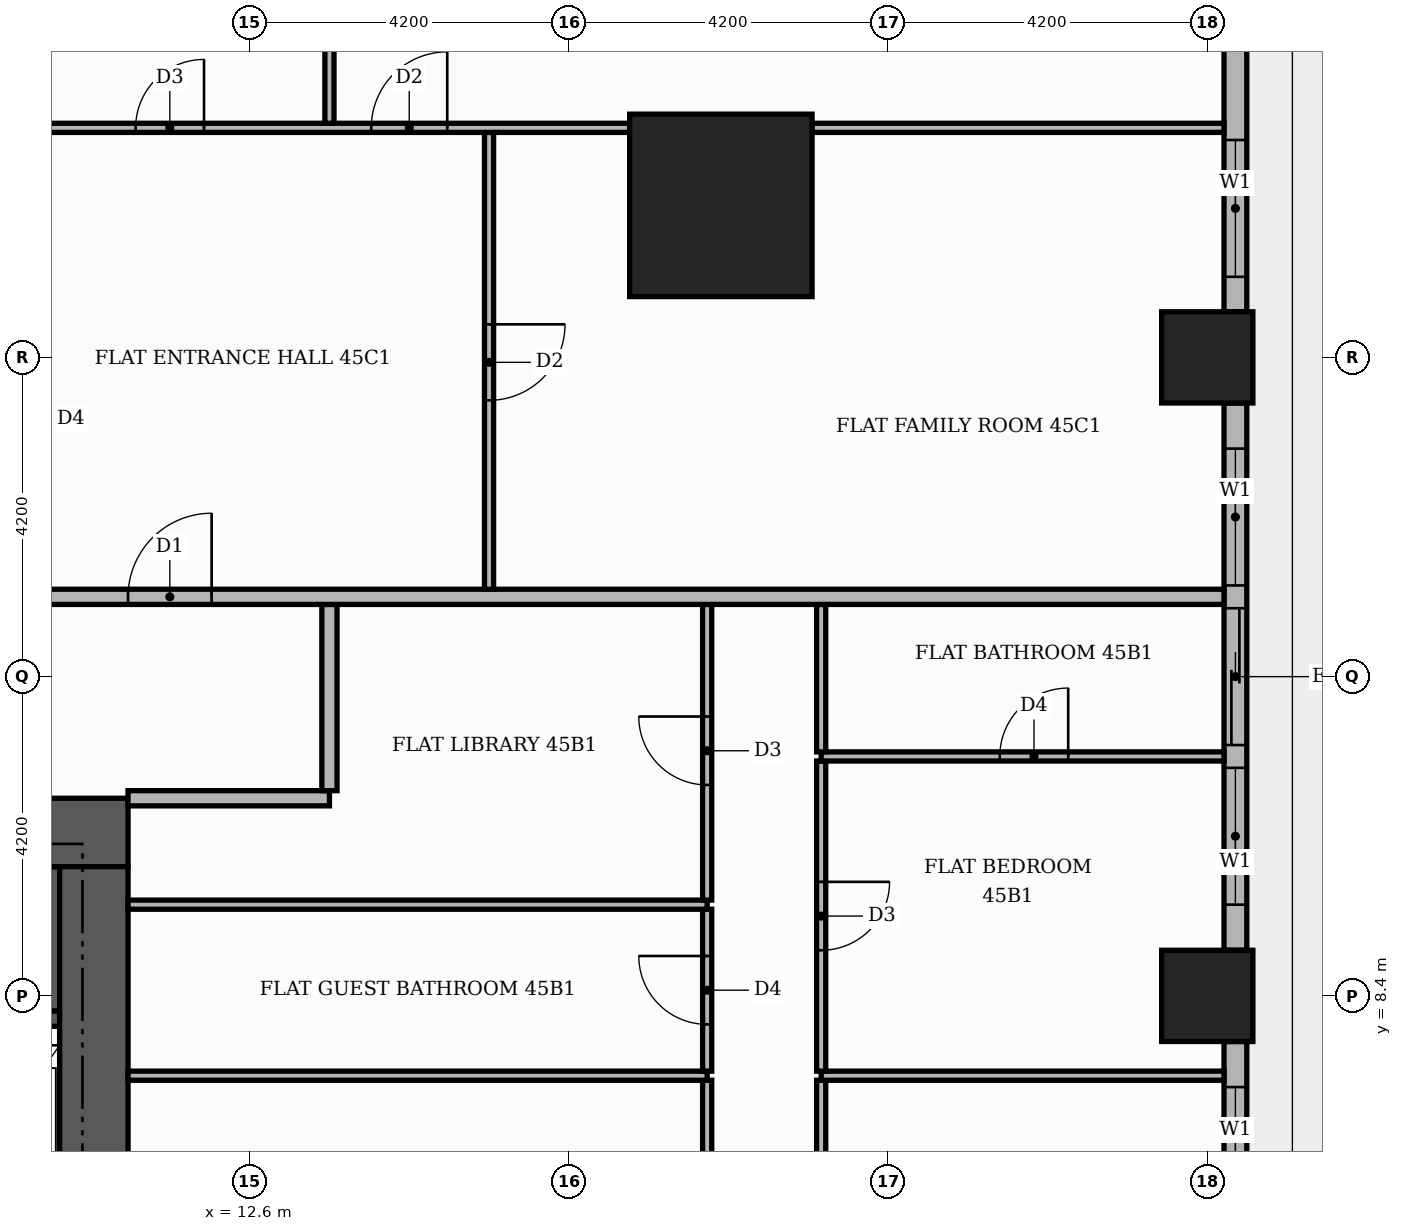
"""IFC4 building model, lengths in metres.
Left out: names, types, materials, properties, quantities, classifications, styles, units other than length and angle.
Written with IfcOpenShell. Run it as: python <this file> out.ifc"""

import sys

from ifc_helpers import new_model, si_unit, direction, frame, frame_2d, origin, origin_2d, place, context, subcontext, project, spatial, rectangle, extrude, element, fill, save


model = new_model("IFC4")
c1 = context("Model", 3, precision=1e-05, world=origin(), true_north=direction((0.0, 1.0)))
c2 = subcontext(c1, "Body", "Model", "MODEL_VIEW")
j1 = project(units=[si_unit("LENGTHUNIT", "METRE"), si_unit("PLANEANGLEUNIT", "RADIAN")], contexts=[c1])
p1 = place(None, origin())
s1 = spatial("IfcSite", under=j1, at=p1, CompositionType="ELEMENT")
p2 = place(p1, origin())
s2 = spatial("IfcBuilding", under=s1, at=p2, CompositionType="ELEMENT")
p3 = place(p2, frame((0.0, 0.0, 192.3)))
s3 = spatial("IfcBuildingStorey", under=s2, at=p3, CompositionType="ELEMENT", Elevation=192.3)
p4 = place(p3, frame((5.5, 9.15, 0.0), z_axis=(0.0, 0.0, 1.0), x_axis=(1.0, 0.0, 0.0)))
e1 = element("IfcWall", 1, at=p4, inside=s3, PredefinedType="SHEAR", context=c2, shape_type="SweptSolid", body=[
    extrude(rectangle(XDim=4.6, YDim=1.9, at=frame_2d((2.3, 0.0))), origin(), (0.0, 0.0, 1.0), 3.48),
])
p5 = place(p3, frame((8.1, 8.1, 0.0), z_axis=(0.0, 0.0, 1.0), x_axis=(1.0, 0.0, 0.0)))
e2 = element("IfcWall", 2, at=p5, inside=s3, PredefinedType="SHEAR", context=c2, shape_type="SweptSolid", body=[
    extrude(rectangle(XDim=2.0, YDim=0.2, at=frame_2d((1.0, 0.0))), origin(), (0.0, 0.0, 1.0), 3.48),
])
p6 = place(p3, frame((-11.0, 10.55, 0.0), z_axis=(0.0, 0.0, 1.0), x_axis=(1.0, 0.0, 0.0)))
e3 = element("IfcWall", 3, at=p6, inside=s3, PredefinedType="SHEAR", context=c2, shape_type="SweptSolid", body=[
    extrude(rectangle(XDim=22.0, YDim=0.9, at=frame_2d((11.0, 0.0))), origin(), (0.0, 0.0, 1.0), 3.48),
])
p7 = place(p6, frame((13.3, 0.0, 0.0)))
e4 = element("IfcOpeningElement", 4, at=p7, cuts=e3, PredefinedType="OPENING", context=c2, shape_type="SweptSolid", body=[
    extrude(rectangle(XDim=1.8, YDim=2.2, at=frame_2d((0.9, 1.1))), frame((0.0, 0.46, 0.0), z_axis=(0.0, -1.0, 0.0), x_axis=(1.0, 0.0, 0.0)), (0.0, 0.0, 1.0), 0.92),
])
p8 = place(p3, frame((10.55, -10.1, 0.0), z_axis=(0.0, 0.0, 1.0), x_axis=(0.0, 1.0, 0.0)))
e5 = element("IfcWall", 5, at=p8, inside=s3, PredefinedType="SHEAR", context=c2, shape_type="SweptSolid", body=[
    extrude(rectangle(XDim=20.2, YDim=0.9, at=frame_2d((10.1, 0.0))), origin(), (0.0, 0.0, 1.0), 3.48),
])
p9 = place(p3, frame((18.8, 18.8, 0.0), z_axis=(0.0, 0.0, 1.0), x_axis=(1.0, 0.0, 0.0)))
e6 = element("IfcColumn", 6, at=p9, inside=s3, PredefinedType="COLUMN", context=c2, shape_type="SweptSolid", body=[
    extrude(rectangle(XDim=2.4, YDim=2.4, at=origin_2d()), origin(), (0.0, 0.0, 1.0), 3.9),
])
for number, where, z_axis, x_axis in (
    (7, (25.2, 8.4, 0.0), (0.0, 0.0, 1.0), (1.0, 0.0, 0.0)),
    (8, (25.2, 16.8, 0.0), (0.0, 0.0, 1.0), (1.0, 0.0, 0.0)),
):
    element("IfcColumn", number, at=place(p3, frame(where, z_axis=z_axis, x_axis=x_axis)), inside=s3, PredefinedType="COLUMN", context=c2, shape_type="SweptSolid", body=[
        extrude(rectangle(XDim=1.2, YDim=1.2, at=origin_2d()), origin(), (0.0, 0.0, 1.0), 3.9),
    ])
p10 = place(p3, frame((25.57, 3.45, 0.0), z_axis=(0.0, 0.0, 1.0), x_axis=(0.0, 1.0, 0.0)))
e9 = element("IfcWall", 9, at=p10, inside=s3, PredefinedType="STANDARD", context=c2, shape_type="SweptSolid", body=[
    extrude(rectangle(XDim=4.35, YDim=0.3, at=frame_2d((2.175, 0.0))), origin(), (0.0, 0.0, 1.0), 3.48),
])
p11 = place(p10, frame((1.95, 0.0, 0.9)))
e10 = element("IfcOpeningElement", 10, at=p11, cuts=e9, PredefinedType="OPENING", context=c2, shape_type="SweptSolid", body=[
    extrude(rectangle(XDim=1.8, YDim=2.1, at=frame_2d((0.9, 1.05))), frame((0.0, 0.16, 0.0), z_axis=(0.0, -1.0, 0.0), x_axis=(1.0, 0.0, 0.0)), (0.0, 0.0, 1.0), 0.32),
])
p12 = place(p3, frame((25.57, 9.0, 0.0), z_axis=(0.0, 0.0, 1.0), x_axis=(0.0, 1.0, 0.0)))
e11 = element("IfcWall", 11, at=p12, inside=s3, PredefinedType="STANDARD", context=c2, shape_type="SweptSolid", body=[
    extrude(rectangle(XDim=7.2, YDim=0.3, at=frame_2d((3.6, 0.0))), origin(), (0.0, 0.0, 1.0), 3.48),
])
p13 = place(p12, frame((0.6, 0.0, 0.9)))
e12 = element("IfcOpeningElement", 12, at=p13, cuts=e11, PredefinedType="OPENING", context=c2, shape_type="SweptSolid", body=[
    extrude(rectangle(XDim=1.8, YDim=2.1, at=frame_2d((0.9, 1.05))), frame((0.0, 0.16, 0.0), z_axis=(0.0, -1.0, 0.0), x_axis=(1.0, 0.0, 0.0)), (0.0, 0.0, 1.0), 0.32),
])
p14 = place(p12, frame((2.7, 0.0, 0.0)))
e13 = element("IfcOpeningElement", 13, at=p14, cuts=e11, PredefinedType="OPENING", context=c2, shape_type="SweptSolid", body=[
    extrude(rectangle(XDim=1.8, YDim=2.4, at=frame_2d((0.9, 1.2))), frame((0.0, 0.16, 0.0), z_axis=(0.0, -1.0, 0.0), x_axis=(1.0, 0.0, 0.0)), (0.0, 0.0, 1.0), 0.32),
])
p15 = place(p12, frame((4.8, 0.0, 0.9)))
e14 = element("IfcOpeningElement", 14, at=p15, cuts=e11, PredefinedType="OPENING", context=c2, shape_type="SweptSolid", body=[
    extrude(rectangle(XDim=1.8, YDim=2.1, at=frame_2d((0.9, 1.05))), frame((0.0, 0.16, 0.0), z_axis=(0.0, -1.0, 0.0), x_axis=(1.0, 0.0, 0.0)), (0.0, 0.0, 1.0), 0.32),
])
p16 = place(p3, frame((25.57, 17.4, 0.0), z_axis=(0.0, 0.0, 1.0), x_axis=(0.0, 1.0, 0.0)))
e15 = element("IfcWall", 15, at=p16, inside=s3, PredefinedType="STANDARD", context=c2, shape_type="SweptSolid", body=[
    extrude(rectangle(XDim=3.82, YDim=0.3, at=frame_2d((1.91, 0.0))), origin(), (0.0, 0.0, 1.0), 3.48),
])
p17 = place(p16, frame((0.46, 0.0, 0.9)))
e16 = element("IfcOpeningElement", 16, at=p17, cuts=e15, PredefinedType="OPENING", context=c2, shape_type="SweptSolid", body=[
    extrude(rectangle(XDim=1.8, YDim=2.1, at=frame_2d((0.9, 1.05))), frame((0.0, 0.16, 0.0), z_axis=(0.0, -1.0, 0.0), x_axis=(1.0, 0.0, 0.0)), (0.0, 0.0, 1.0), 0.32),
])
p18 = place(p3, frame((18.62, 3.21, 0.0), z_axis=(0.0, 0.0, 1.0), x_axis=(0.0, 1.0, 0.0)))
e17 = element("IfcWall", 17, at=p18, inside=s3, PredefinedType="PARTITIONING", context=c2, shape_type="SweptSolid", body=[
    extrude(rectangle(XDim=4.08, YDim=0.12, at=frame_2d((2.04, 0.0))), origin(), (0.0, 0.0, 1.0), 3.48),
])
p19 = place(p18, frame((1.59, 0.0, 0.0)))
e18 = element("IfcOpeningElement", 18, at=p19, cuts=e17, PredefinedType="OPENING", context=c2, shape_type="SweptSolid", body=[
    extrude(rectangle(XDim=0.9, YDim=2.1, at=frame_2d((0.45, 1.05))), frame((0.0, 0.07, 0.0), z_axis=(0.0, -1.0, 0.0), x_axis=(1.0, 0.0, 0.0)), (0.0, 0.0, 1.0), 0.14),
])
p20 = place(p3, frame((20.12, 3.21, 0.0), z_axis=(0.0, 0.0, 1.0), x_axis=(0.0, 1.0, 0.0)))
e19 = element("IfcWall", 19, at=p20, inside=s3, PredefinedType="PARTITIONING", context=c2, shape_type="SweptSolid", body=[
    extrude(rectangle(XDim=4.08, YDim=0.12, at=frame_2d((2.04, 0.0))), origin(), (0.0, 0.0, 1.0), 3.48),
])
p21 = place(p20, frame((1.59, 0.0, 0.0)))
e20 = element("IfcOpeningElement", 20, at=p21, cuts=e19, PredefinedType="OPENING", context=c2, shape_type="SweptSolid", body=[
    extrude(rectangle(XDim=0.9, YDim=2.1, at=frame_2d((0.45, 1.05))), frame((0.0, 0.07, 0.0), z_axis=(0.0, -1.0, 0.0), x_axis=(1.0, 0.0, 0.0)), (0.0, 0.0, 1.0), 0.14),
])
p22 = place(p3, frame((11.0, 7.35, 0.0), z_axis=(0.0, 0.0, 1.0), x_axis=(1.0, 0.0, 0.0)))
e21 = element("IfcWall", 21, at=p22, inside=s3, PredefinedType="PARTITIONING", context=c2, shape_type="SweptSolid", body=[
    extrude(rectangle(XDim=7.62, YDim=0.12, at=frame_2d((3.81, 0.0))), origin(), (0.0, 0.0, 1.0), 3.48),
])
p23 = place(p3, frame((20.12, 7.35, 0.0), z_axis=(0.0, 0.0, 1.0), x_axis=(1.0, 0.0, 0.0)))
e22 = element("IfcWall", 22, at=p23, inside=s3, PredefinedType="PARTITIONING", context=c2, shape_type="SweptSolid", body=[
    extrude(rectangle(XDim=5.3, YDim=0.12, at=frame_2d((2.65, 0.0))), origin(), (0.0, 0.0, 1.0), 3.48),
])
p24 = place(p3, frame((18.62, 7.41, 0.0), z_axis=(0.0, 0.0, 1.0), x_axis=(0.0, 1.0, 0.0)))
e23 = element("IfcWall", 23, at=p24, inside=s3, PredefinedType="PARTITIONING", context=c2, shape_type="SweptSolid", body=[
    extrude(rectangle(XDim=2.13, YDim=0.12, at=frame_2d((1.065, 0.0))), origin(), (0.0, 0.0, 1.0), 3.48),
])
p25 = place(p24, frame((0.615, 0.0, 0.0)))
e24 = element("IfcOpeningElement", 24, at=p25, cuts=e23, PredefinedType="OPENING", context=c2, shape_type="SweptSolid", body=[
    extrude(rectangle(XDim=0.9, YDim=2.1, at=frame_2d((0.45, 1.05))), frame((0.0, 0.07, 0.0), z_axis=(0.0, -1.0, 0.0), x_axis=(1.0, 0.0, 0.0)), (0.0, 0.0, 1.0), 0.14),
])
p26 = place(p3, frame((20.12, 7.41, 0.0), z_axis=(0.0, 0.0, 1.0), x_axis=(0.0, 1.0, 0.0)))
e25 = element("IfcWall", 25, at=p26, inside=s3, PredefinedType="PARTITIONING", context=c2, shape_type="SweptSolid", body=[
    extrude(rectangle(XDim=4.08, YDim=0.12, at=frame_2d((2.04, 0.0))), origin(), (0.0, 0.0, 1.0), 3.48),
])
p27 = place(p26, frame((1.59, 0.0, 0.0)))
e26 = element("IfcOpeningElement", 26, at=p27, cuts=e25, PredefinedType="OPENING", context=c2, shape_type="SweptSolid", body=[
    extrude(rectangle(XDim=0.9, YDim=2.1, at=frame_2d((0.45, 1.05))), frame((0.0, 0.07, 0.0), z_axis=(0.0, -1.0, 0.0), x_axis=(1.0, 0.0, 0.0)), (0.0, 0.0, 1.0), 0.14),
])
p28 = place(p3, frame((11.0, 9.6, 0.0), z_axis=(0.0, 0.0, 1.0), x_axis=(1.0, 0.0, 0.0)))
e27 = element("IfcWall", 27, at=p28, inside=s3, PredefinedType="PARTITIONING", context=c2, shape_type="SweptSolid", body=[
    extrude(rectangle(XDim=7.62, YDim=0.12, at=frame_2d((3.81, 0.0))), origin(), (0.0, 0.0, 1.0), 3.48),
])
p29 = place(p3, frame((18.62, 9.66, 0.0), z_axis=(0.0, 0.0, 1.0), x_axis=(0.0, 1.0, 0.0)))
e28 = element("IfcWall", 28, at=p29, inside=s3, PredefinedType="PARTITIONING", context=c2, shape_type="SweptSolid", body=[
    extrude(rectangle(XDim=3.89, YDim=0.12, at=frame_2d((1.945, 0.0))), origin(), (0.0, 0.0, 1.0), 3.48),
])
p30 = place(p29, frame((1.515, 0.0, 0.0)))
e29 = element("IfcOpeningElement", 29, at=p30, cuts=e28, PredefinedType="OPENING", context=c2, shape_type="SweptSolid", body=[
    extrude(rectangle(XDim=0.9, YDim=2.1, at=frame_2d((0.45, 1.05))), frame((0.0, 0.07, 0.0), z_axis=(0.0, -1.0, 0.0), x_axis=(1.0, 0.0, 0.0)), (0.0, 0.0, 1.0), 0.14),
])
p31 = place(p3, frame((11.0, 11.0, 0.0), z_axis=(0.0, 0.0, 1.0), x_axis=(1.0, 0.0, 0.0)))
e30 = element("IfcWall", 30, at=p31, inside=s3, PredefinedType="PARTITIONING", context=c2, shape_type="SweptSolid", body=[
    extrude(rectangle(XDim=2.65, YDim=0.2, at=frame_2d((1.325, 0.0))), origin(), (0.0, 0.0, 1.0), 3.48),
])
p32 = place(p3, frame((13.65, 11.1, 0.0), z_axis=(0.0, 0.0, 1.0), x_axis=(0.0, 1.0, 0.0)))
e31 = element("IfcWall", 31, at=p32, inside=s3, PredefinedType="PARTITIONING", context=c2, shape_type="SweptSolid", body=[
    extrude(rectangle(XDim=2.45, YDim=0.2, at=frame_2d((1.225, 0.0))), origin(), (0.0, 0.0, 1.0), 3.48),
])
p33 = place(p3, frame((20.12, 11.55, 0.0), z_axis=(0.0, 0.0, 1.0), x_axis=(1.0, 0.0, 0.0)))
e32 = element("IfcWall", 32, at=p33, inside=s3, PredefinedType="PARTITIONING", context=c2, shape_type="SweptSolid", body=[
    extrude(rectangle(XDim=5.3, YDim=0.12, at=frame_2d((2.65, 0.0))), origin(), (0.0, 0.0, 1.0), 3.48),
])
p34 = place(p33, frame((2.35, 0.0, 0.0)))
e33 = element("IfcOpeningElement", 33, at=p34, cuts=e32, PredefinedType="OPENING", context=c2, shape_type="SweptSolid", body=[
    extrude(rectangle(XDim=0.9, YDim=2.1, at=frame_2d((0.45, 1.05))), frame((0.0, 0.07, 0.0), z_axis=(0.0, -1.0, 0.0), x_axis=(1.0, 0.0, 0.0)), (0.0, 0.0, 1.0), 0.14),
])
p35 = place(p3, frame((20.12, 11.61, 0.0), z_axis=(0.0, 0.0, 1.0), x_axis=(0.0, 1.0, 0.0)))
e34 = element("IfcWall", 34, at=p35, inside=s3, PredefinedType="PARTITIONING", context=c2, shape_type="SweptSolid", body=[
    extrude(rectangle(XDim=1.94, YDim=0.12, at=frame_2d((0.97, 0.0))), origin(), (0.0, 0.0, 1.0), 3.48),
])
p36 = place(p3, frame((-13.65, 13.65, 0.0), z_axis=(0.0, 0.0, 1.0), x_axis=(1.0, 0.0, 0.0)))
e35 = element("IfcWall", 35, at=p36, inside=s3, PredefinedType="PARTITIONING", context=c2, shape_type="SweptSolid", body=[
    extrude(rectangle(XDim=39.07, YDim=0.2, at=frame_2d((19.535, 0.0))), origin(), (0.0, 0.0, 1.0), 3.48),
])
p37 = place(p36, frame((24.65, 0.0, 0.0)))
e36 = element("IfcOpeningElement", 36, at=p37, cuts=e35, PredefinedType="OPENING", context=c2, shape_type="SweptSolid", body=[
    extrude(rectangle(XDim=1.1, YDim=2.4, at=frame_2d((0.55, 1.2))), frame((0.0, 0.11, 0.0), z_axis=(0.0, -1.0, 0.0), x_axis=(1.0, 0.0, 0.0)), (0.0, 0.0, 1.0), 0.22),
])
p38 = place(p36, frame((14.15, 0.0, 0.0)))
e37 = element("IfcOpeningElement", 37, at=p38, cuts=e35, PredefinedType="OPENING", context=c2, shape_type="SweptSolid", body=[
    extrude(rectangle(XDim=1.1, YDim=2.4, at=frame_2d((0.55, 1.2))), frame((0.0, 0.11, 0.0), z_axis=(0.0, -1.0, 0.0), x_axis=(1.0, 0.0, 0.0)), (0.0, 0.0, 1.0), 0.22),
])
p39 = place(p3, frame((15.75, 13.75, 0.0), z_axis=(0.0, 0.0, 1.0), x_axis=(0.0, 1.0, 0.0)))
e38 = element("IfcWall", 38, at=p39, inside=s3, PredefinedType="PARTITIONING", context=c2, shape_type="SweptSolid", body=[
    extrude(rectangle(XDim=6.01, YDim=0.12, at=frame_2d((3.005, 0.0))), origin(), (0.0, 0.0, 1.0), 3.48),
])
p40 = place(p39, frame((2.485, 0.0, 0.0)))
e39 = element("IfcOpeningElement", 39, at=p40, cuts=e38, PredefinedType="OPENING", context=c2, shape_type="SweptSolid", body=[
    extrude(rectangle(XDim=1.0, YDim=2.1, at=frame_2d((0.5, 1.05))), frame((0.0, 0.07, 0.0), z_axis=(0.0, -1.0, 0.0), x_axis=(1.0, 0.0, 0.0)), (0.0, 0.0, 1.0), 0.14),
])
p41 = place(p3, frame((5.35, 19.82, 0.0), z_axis=(0.0, 0.0, 1.0), x_axis=(1.0, 0.0, 0.0)))
e40 = element("IfcWall", 40, at=p41, inside=s3, PredefinedType="PARTITIONING", context=c2, shape_type="SweptSolid", body=[
    extrude(rectangle(XDim=12.25, YDim=0.12, at=frame_2d((6.125, 0.0))), origin(), (0.0, 0.0, 1.0), 3.48),
])
p42 = place(p41, frame((8.85, 0.0, 0.0)))
e41 = element("IfcOpeningElement", 41, at=p42, cuts=e40, PredefinedType="OPENING", context=c2, shape_type="SweptSolid", body=[
    extrude(rectangle(XDim=1.0, YDim=2.1, at=frame_2d((0.5, 1.05))), frame((0.0, 0.07, 0.0), z_axis=(0.0, -1.0, 0.0), x_axis=(1.0, 0.0, 0.0)), (0.0, 0.0, 1.0), 0.14),
])
p43 = place(p41, frame((5.75, 0.0, 0.0)))
e42 = element("IfcOpeningElement", 42, at=p43, cuts=e40, PredefinedType="OPENING", context=c2, shape_type="SweptSolid", body=[
    extrude(rectangle(XDim=0.9, YDim=2.1, at=frame_2d((0.45, 1.05))), frame((0.0, 0.07, 0.0), z_axis=(0.0, -1.0, 0.0), x_axis=(1.0, 0.0, 0.0)), (0.0, 0.0, 1.0), 0.14),
])
p44 = place(p3, frame((20.0, 19.82, 0.0), z_axis=(0.0, 0.0, 1.0), x_axis=(1.0, 0.0, 0.0)))
e43 = element("IfcWall", 43, at=p44, inside=s3, PredefinedType="PARTITIONING", context=c2, shape_type="SweptSolid", body=[
    extrude(rectangle(XDim=5.42, YDim=0.12, at=frame_2d((2.71, 0.0))), origin(), (0.0, 0.0, 1.0), 3.48),
])
p45 = place(p3, frame((13.65, 19.88, 0.0), z_axis=(0.0, 0.0, 1.0), x_axis=(0.0, 1.0, 0.0)))
e44 = element("IfcWall", 44, at=p45, inside=s3, PredefinedType="PARTITIONING", context=c2, shape_type="SweptSolid", body=[
    extrude(rectangle(XDim=5.54, YDim=0.12, at=frame_2d((2.77, 0.0))), origin(), (0.0, 0.0, 1.0), 3.48),
])
p46 = place(p11, origin())
e45 = element("IfcWindow", 45, at=p46, inside=s3, PartitioningType="SINGLE_PANEL", PredefinedType="WINDOW", context=c2, shape_type="SweptSolid", body=[
    extrude(rectangle(XDim=1.8, YDim=2.1, at=frame_2d((0.9, 1.05))), frame((0.0, 0.03, 0.0), z_axis=(0.0, -1.0, 0.0), x_axis=(1.0, 0.0, 0.0)), (0.0, 0.0, 1.0), 0.06),
])
fill(e10, e45)
p47 = place(p13, origin())
e46 = element("IfcWindow", 46, at=p47, inside=s3, PartitioningType="SINGLE_PANEL", PredefinedType="WINDOW", context=c2, shape_type="SweptSolid", body=[
    extrude(rectangle(XDim=1.8, YDim=2.1, at=frame_2d((0.9, 1.05))), frame((0.0, 0.03, 0.0), z_axis=(0.0, -1.0, 0.0), x_axis=(1.0, 0.0, 0.0)), (0.0, 0.0, 1.0), 0.06),
])
fill(e12, e46)
p48 = place(p14, origin())
e47 = element("IfcDoor", 47, at=p48, inside=s3, OperationType="SLIDING_TO_RIGHT", PredefinedType="DOOR", context=c2, shape_type="SweptSolid", body=[
    extrude(rectangle(XDim=1.8, YDim=2.4, at=frame_2d((0.9, 1.2))), frame((0.0, 0.025, 0.0), z_axis=(0.0, -1.0, 0.0), x_axis=(1.0, 0.0, 0.0)), (0.0, 0.0, 1.0), 0.05),
])
fill(e13, e47)
p49 = place(p15, origin())
e48 = element("IfcWindow", 48, at=p49, inside=s3, PartitioningType="SINGLE_PANEL", PredefinedType="WINDOW", context=c2, shape_type="SweptSolid", body=[
    extrude(rectangle(XDim=1.8, YDim=2.1, at=frame_2d((0.9, 1.05))), frame((0.0, 0.03, 0.0), z_axis=(0.0, -1.0, 0.0), x_axis=(1.0, 0.0, 0.0)), (0.0, 0.0, 1.0), 0.06),
])
fill(e14, e48)
p50 = place(p17, origin())
e49 = element("IfcWindow", 49, at=p50, inside=s3, PartitioningType="SINGLE_PANEL", PredefinedType="WINDOW", context=c2, shape_type="SweptSolid", body=[
    extrude(rectangle(XDim=1.8, YDim=2.1, at=frame_2d((0.9, 1.05))), frame((0.0, 0.03, 0.0), z_axis=(0.0, -1.0, 0.0), x_axis=(1.0, 0.0, 0.0)), (0.0, 0.0, 1.0), 0.06),
])
fill(e16, e49)
p51 = place(p25, origin())
e50 = element("IfcDoor", 50, at=p51, inside=s3, OperationType="SINGLE_SWING_RIGHT", PredefinedType="DOOR", context=c2, shape_type="SweptSolid", body=[
    extrude(rectangle(XDim=0.9, YDim=2.1, at=frame_2d((0.45, 1.05))), frame((0.0, 0.025, 0.0), z_axis=(0.0, -1.0, 0.0), x_axis=(1.0, 0.0, 0.0)), (0.0, 0.0, 1.0), 0.05),
])
fill(e24, e50)
p52 = place(p30, origin())
e51 = element("IfcDoor", 51, at=p52, inside=s3, OperationType="SINGLE_SWING_RIGHT", PredefinedType="DOOR", context=c2, shape_type="SweptSolid", body=[
    extrude(rectangle(XDim=0.9, YDim=2.1, at=frame_2d((0.45, 1.05))), frame((0.0, 0.025, 0.0), z_axis=(0.0, -1.0, 0.0), x_axis=(1.0, 0.0, 0.0)), (0.0, 0.0, 1.0), 0.05),
])
fill(e29, e51)
p53 = place(p27, frame((0.9, 0.0, 0.0), z_axis=(0.0, 0.0, 1.0), x_axis=(-1.0, 0.0, 0.0)))
e52 = element("IfcDoor", 52, at=p53, inside=s3, OperationType="SINGLE_SWING_RIGHT", PredefinedType="DOOR", context=c2, shape_type="SweptSolid", body=[
    extrude(rectangle(XDim=0.9, YDim=2.1, at=frame_2d((0.45, 1.05))), frame((0.0, 0.025, 0.0), z_axis=(0.0, -1.0, 0.0), x_axis=(1.0, 0.0, 0.0)), (0.0, 0.0, 1.0), 0.05),
])
fill(e26, e52)
p54 = place(p34, origin())
e53 = element("IfcDoor", 53, at=p54, inside=s3, OperationType="SINGLE_SWING_RIGHT", PredefinedType="DOOR", context=c2, shape_type="SweptSolid", body=[
    extrude(rectangle(XDim=0.9, YDim=2.1, at=frame_2d((0.45, 1.05))), frame((0.0, 0.025, 0.0), z_axis=(0.0, -1.0, 0.0), x_axis=(1.0, 0.0, 0.0)), (0.0, 0.0, 1.0), 0.05),
])
fill(e33, e53)
p55 = place(p37, origin())
e54 = element("IfcDoor", 54, at=p55, inside=s3, OperationType="SINGLE_SWING_RIGHT", PredefinedType="DOOR", context=c2, shape_type="SweptSolid", body=[
    extrude(rectangle(XDim=1.1, YDim=2.4, at=frame_2d((0.55, 1.2))), frame((0.0, 0.025, 0.0), z_axis=(0.0, -1.0, 0.0), x_axis=(1.0, 0.0, 0.0)), (0.0, 0.0, 1.0), 0.05),
])
fill(e36, e54)
p56 = place(p40, frame((1.0, 0.0, 0.0), z_axis=(0.0, 0.0, 1.0), x_axis=(-1.0, 0.0, 0.0)))
e55 = element("IfcDoor", 55, at=p56, inside=s3, OperationType="SINGLE_SWING_RIGHT", PredefinedType="DOOR", context=c2, shape_type="SweptSolid", body=[
    extrude(rectangle(XDim=1.0, YDim=2.1, at=frame_2d((0.5, 1.05))), frame((0.0, 0.025, 0.0), z_axis=(0.0, -1.0, 0.0), x_axis=(1.0, 0.0, 0.0)), (0.0, 0.0, 1.0), 0.05),
])
fill(e39, e55)
p57 = place(p42, origin())
e56 = element("IfcDoor", 56, at=p57, inside=s3, OperationType="SINGLE_SWING_RIGHT", PredefinedType="DOOR", context=c2, shape_type="SweptSolid", body=[
    extrude(rectangle(XDim=1.0, YDim=2.1, at=frame_2d((0.5, 1.05))), frame((0.0, 0.025, 0.0), z_axis=(0.0, -1.0, 0.0), x_axis=(1.0, 0.0, 0.0)), (0.0, 0.0, 1.0), 0.05),
])
fill(e41, e56)
p58 = place(p43, origin())
e57 = element("IfcDoor", 57, at=p58, inside=s3, OperationType="SINGLE_SWING_RIGHT", PredefinedType="DOOR", context=c2, shape_type="SweptSolid", body=[
    extrude(rectangle(XDim=0.9, YDim=2.1, at=frame_2d((0.45, 1.05))), frame((0.0, 0.025, 0.0), z_axis=(0.0, -1.0, 0.0), x_axis=(1.0, 0.0, 0.0)), (0.0, 0.0, 1.0), 0.05),
])
fill(e42, e57)
save(model, sys.argv[1])
